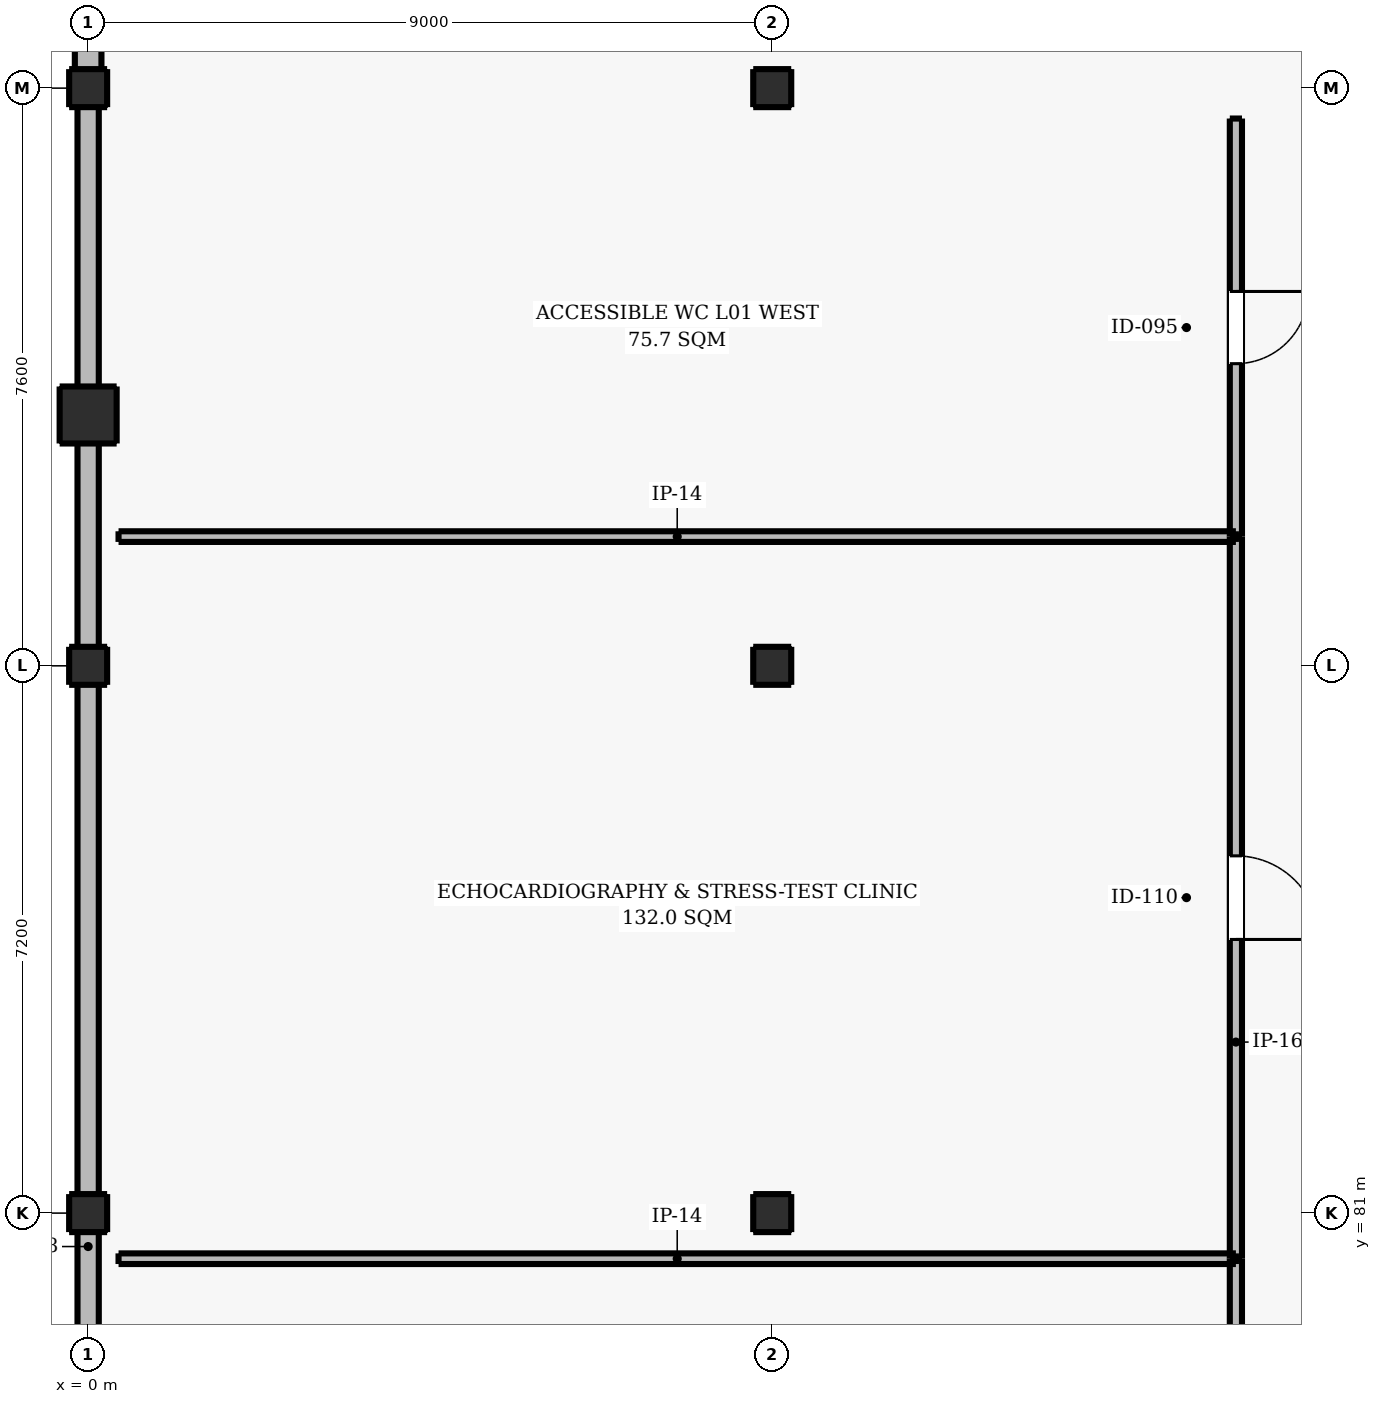
"""IFC4 building model, lengths in metres.
Left out: names, types, materials, properties, quantities, classifications, styles, units other than length and angle.
Written with IfcOpenShell. Run it as: python <this file> out.ifc"""

import sys

from ifc_helpers import new_model, si_unit, direction, frame, frame_2d, origin, origin_2d, place, context, subcontext, project, spatial, rectangle, extrude, element, fill, save


model = new_model("IFC4")
c1 = context("Model", 3, precision=1e-05, world=origin(), true_north=direction((0.0, 1.0)))
c2 = subcontext(c1, "Body", "Model", "MODEL_VIEW")
j1 = project(units=[si_unit("LENGTHUNIT", "METRE"), si_unit("PLANEANGLEUNIT", "RADIAN")], contexts=[c1])
p1 = place(None, origin())
s1 = spatial("IfcSite", under=j1, at=p1, CompositionType="ELEMENT")
p2 = place(p1, origin())
s2 = spatial("IfcBuilding", under=s1, at=p2, CompositionType="ELEMENT")
p3 = place(p2, frame((0.0, 0.0, 5.1)))
s3 = spatial("IfcBuildingStorey", under=s2, at=p3, CompositionType="ELEMENT", Elevation=5.1)
for number, where, z_axis, x_axis in (
    (1, (0.0, 81.0, 0.0), (0.0, 0.0, 1.0), (1.0, 0.0, 0.0)),
    (2, (0.0, 88.2, 0.0), (0.0, 0.0, 1.0), (1.0, 0.0, 0.0)),
):
    element("IfcColumn", number, at=place(p3, frame(where, z_axis=z_axis, x_axis=x_axis)), inside=s3, PredefinedType="COLUMN", context=c2, shape_type="SweptSolid", body=[
        extrude(rectangle(XDim=0.5, YDim=0.5, at=origin_2d()), origin(), (0.0, 0.0, 1.0), 4.5),
    ])
p4 = place(p3, frame((0.0, 91.5, 0.0), z_axis=(0.0, 0.0, 1.0), x_axis=(1.0, 0.0, 0.0)))
e3 = element("IfcColumn", 3, at=p4, inside=s3, PredefinedType="PILASTER", context=c2, shape_type="SweptSolid", body=[
    extrude(rectangle(XDim=0.75, YDim=0.75, at=origin_2d()), origin(), (0.0, 0.0, 1.0), 4.5),
])
for number, where, z_axis, x_axis in (
    (4, (0.0, 95.8, 0.0), (0.0, 0.0, 1.0), (1.0, 0.0, 0.0)),
    (5, (9.0, 81.0, 0.0), (0.0, 0.0, 1.0), (1.0, 0.0, 0.0)),
    (6, (9.0, 88.2, 0.0), (0.0, 0.0, 1.0), (1.0, 0.0, 0.0)),
    (7, (9.0, 95.8, 0.0), (0.0, 0.0, 1.0), (1.0, 0.0, 0.0)),
):
    element("IfcColumn", number, at=place(p3, frame(where, z_axis=z_axis, x_axis=x_axis)), inside=s3, PredefinedType="COLUMN", context=c2, shape_type="SweptSolid", body=[
        extrude(rectangle(XDim=0.5, YDim=0.5, at=origin_2d()), origin(), (0.0, 0.0, 1.0), 4.5),
    ])
p5 = place(p3, frame((0.0, 45.0, 0.0), z_axis=(0.0, 0.0, 1.0), x_axis=(0.0, 1.0, 0.0)))
e8 = element("IfcWall", 8, at=p5, inside=s3, PredefinedType="SOLIDWALL", context=c2, shape_type="SweptSolid", body=[
    extrude(rectangle(XDim=50.8, YDim=0.28, at=frame_2d((25.4, 0.0))), origin(), (0.0, 0.0, 1.0), 3.28),
])
p6 = place(p3, frame((0.0, 95.8, 0.0), z_axis=(0.0, 0.0, 1.0), x_axis=(0.0, 1.0, 0.0)))
e9 = element("IfcWall", 9, at=p6, inside=s3, PredefinedType="SOLIDWALL", context=c2, shape_type="SweptSolid", body=[
    extrude(rectangle(XDim=10.2, YDim=0.35, at=frame_2d((5.1, 0.0))), origin(), (0.0, 0.0, 1.0), 3.28),
])
p7 = place(p3, frame((15.1, 71.4, 0.0), z_axis=(0.0, 0.0, 1.0), x_axis=(0.0, 1.0, 0.0)))
e10 = element("IfcWall", 10, at=p7, inside=s3, PredefinedType="PARTITIONING", context=c2, shape_type="SweptSolid", body=[
    extrude(rectangle(XDim=9.0, YDim=0.16, at=frame_2d((4.5, 0.0))), origin(), (0.0, 0.0, 1.0), 3.73),
])
p8 = place(p7, frame((3.9, 0.0, 0.0)))
e11 = element("IfcOpeningElement", 11, at=p8, cuts=e10, PredefinedType="OPENING", context=c2, shape_type="SweptSolid", body=[
    extrude(rectangle(XDim=1.25, YDim=2.2, at=frame_2d((0.625, 1.1))), frame((0.0, 0.09, 0.0), z_axis=(0.0, -1.0, 0.0), x_axis=(1.0, 0.0, 0.0)), (0.0, 0.0, 1.0), 0.18),
])
p9 = place(p3, frame((0.4, 80.4, 0.0), z_axis=(0.0, 0.0, 1.0), x_axis=(1.0, 0.0, 0.0)))
e12 = element("IfcWall", 12, at=p9, inside=s3, PredefinedType="PARTITIONING", context=c2, shape_type="SweptSolid", body=[
    extrude(rectangle(XDim=14.7, YDim=0.14, at=frame_2d((7.35, 0.0))), origin(), (0.0, 0.0, 1.0), 4.21),
])
p10 = place(p3, frame((15.1, 80.4, 0.0), z_axis=(0.0, 0.0, 1.0), x_axis=(0.0, 1.0, 0.0)))
e13 = element("IfcWall", 13, at=p10, inside=s3, PredefinedType="PARTITIONING", context=c2, shape_type="SweptSolid", body=[
    extrude(rectangle(XDim=9.5, YDim=0.16, at=frame_2d((4.75, 0.0))), origin(), (0.0, 0.0, 1.0), 3.73),
])
p11 = place(p10, frame((4.2, 0.0, 0.0)))
e14 = element("IfcOpeningElement", 14, at=p11, cuts=e13, PredefinedType="OPENING", context=c2, shape_type="SweptSolid", body=[
    extrude(rectangle(XDim=1.1, YDim=2.15, at=frame_2d((0.55, 1.075))), frame((0.0, 0.09, 0.0), z_axis=(0.0, -1.0, 0.0), x_axis=(1.0, 0.0, 0.0)), (0.0, 0.0, 1.0), 0.18),
])
p12 = place(p3, frame((0.4, 89.9, 0.0), z_axis=(0.0, 0.0, 1.0), x_axis=(1.0, 0.0, 0.0)))
e15 = element("IfcWall", 15, at=p12, inside=s3, PredefinedType="PARTITIONING", context=c2, shape_type="SweptSolid", body=[
    extrude(rectangle(XDim=14.7, YDim=0.14, at=frame_2d((7.35, 0.0))), origin(), (0.0, 0.0, 1.0), 4.21),
])
p13 = place(p3, frame((15.1, 89.9, 0.0), z_axis=(0.0, 0.0, 1.0), x_axis=(0.0, 1.0, 0.0)))
e16 = element("IfcWall", 16, at=p13, inside=s3, PredefinedType="PARTITIONING", context=c2, shape_type="SweptSolid", body=[
    extrude(rectangle(XDim=5.5, YDim=0.16, at=frame_2d((2.75, 0.0))), origin(), (0.0, 0.0, 1.0), 3.89),
])
p14 = place(p13, frame((2.275, 0.0, 0.0)))
e17 = element("IfcOpeningElement", 17, at=p14, cuts=e16, PredefinedType="OPENING", context=c2, shape_type="SweptSolid", body=[
    extrude(rectangle(XDim=0.95, YDim=2.1, at=frame_2d((0.475, 1.05))), frame((0.0, 0.09, 0.0), z_axis=(0.0, -1.0, 0.0), x_axis=(1.0, 0.0, 0.0)), (0.0, 0.0, 1.0), 0.18),
])
p15 = place(p11, frame((1.1, 0.0, 0.0), z_axis=(0.0, 0.0, 1.0), x_axis=(-1.0, 0.0, 0.0)))
e18 = element("IfcDoor", 18, at=p15, inside=s3, OperationType="SINGLE_SWING_LEFT", PredefinedType="DOOR", context=c2, shape_type="SweptSolid", body=[
    extrude(rectangle(XDim=1.1, YDim=2.15, at=frame_2d((0.55, 1.075))), frame((0.0, 0.025, 0.0), z_axis=(0.0, -1.0, 0.0), x_axis=(1.0, 0.0, 0.0)), (0.0, 0.0, 1.0), 0.05),
])
fill(e14, e18)
p16 = place(p14, frame((0.95, 0.0, 0.0), z_axis=(0.0, 0.0, 1.0), x_axis=(-1.0, 0.0, 0.0)))
e19 = element("IfcDoor", 19, at=p16, inside=s3, OperationType="SINGLE_SWING_RIGHT", PredefinedType="DOOR", context=c2, shape_type="SweptSolid", body=[
    extrude(rectangle(XDim=0.95, YDim=2.1, at=frame_2d((0.475, 1.05))), frame((0.0, 0.025, 0.0), z_axis=(0.0, -1.0, 0.0), x_axis=(1.0, 0.0, 0.0)), (0.0, 0.0, 1.0), 0.05),
])
fill(e17, e19)
save(model, sys.argv[1])
